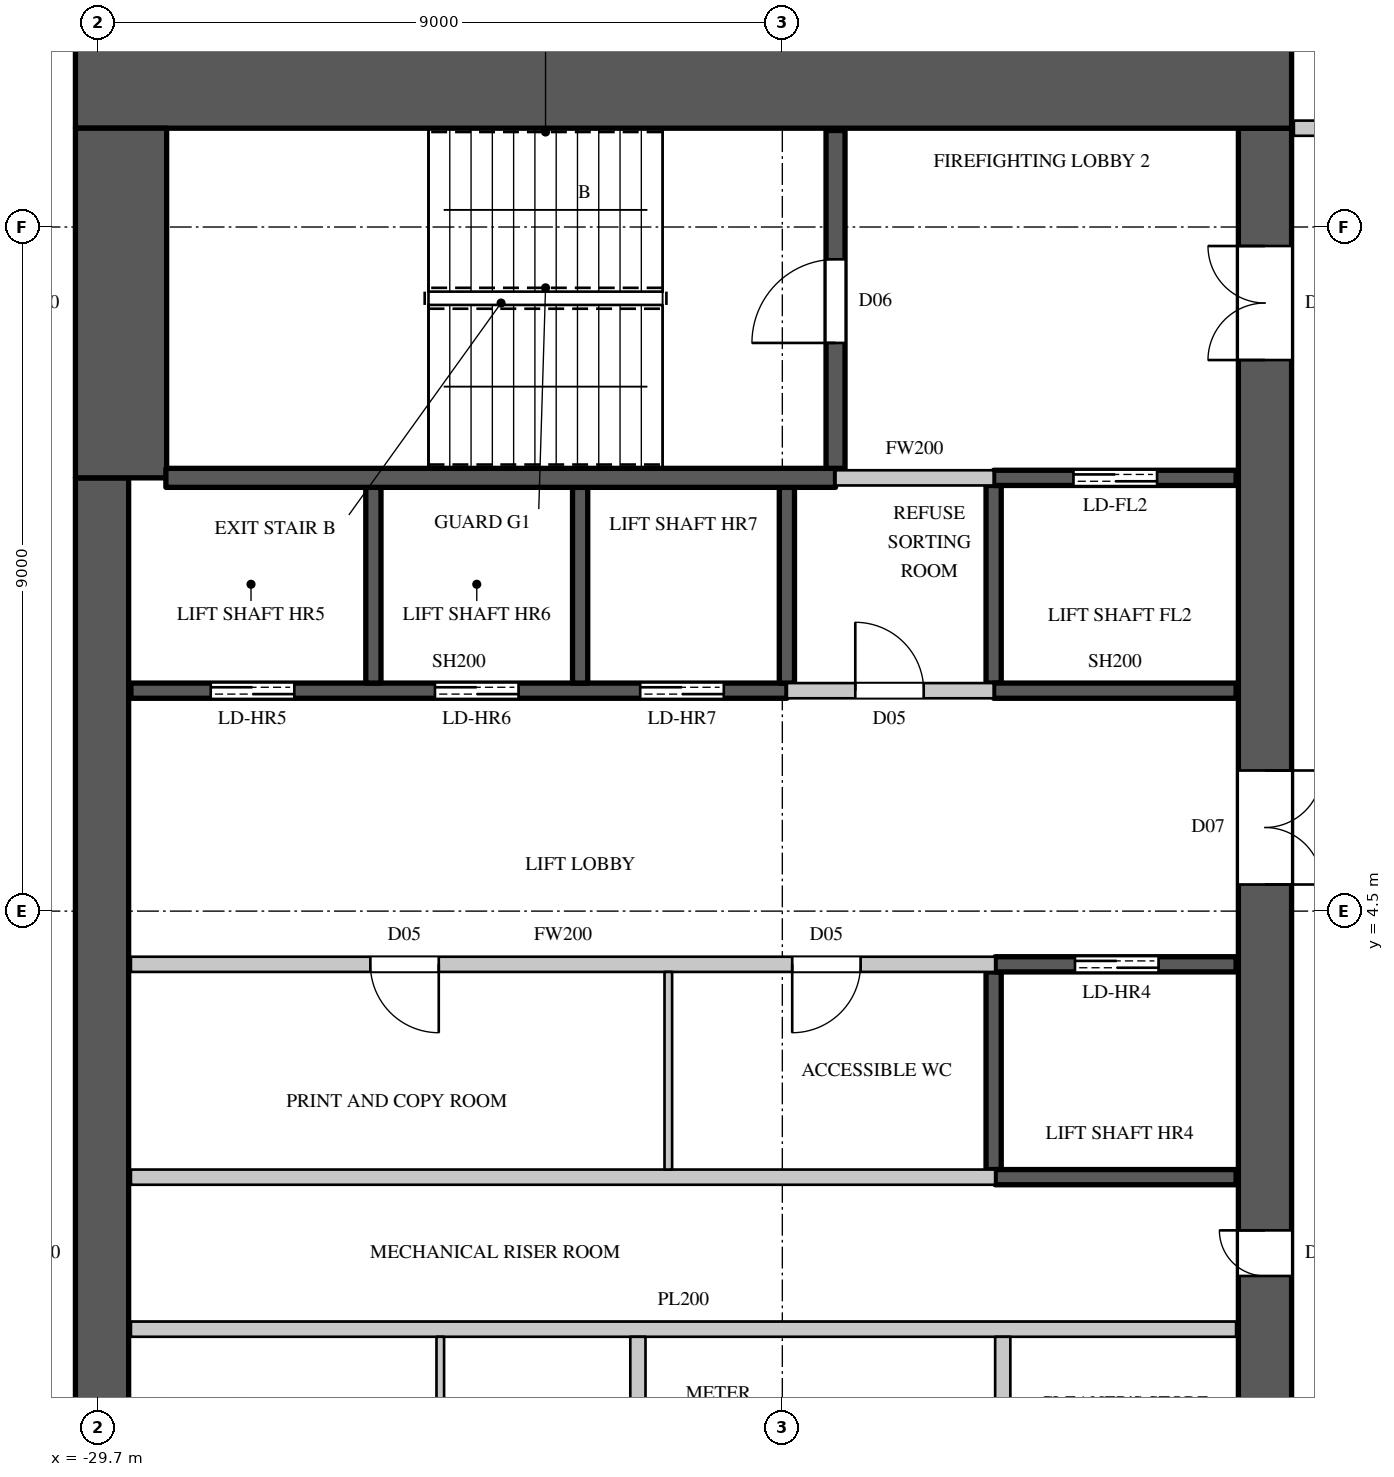
"""IFC4 building model, lengths in metres.
Left out: names, types, materials, properties, quantities, classifications, styles, units other than length and angle.
Written with IfcOpenShell. Run it as: python <this file> out.ifc"""

import sys

from ifc_helpers import new_model, si_unit, direction, frame, frame_2d, origin, place, context, subcontext, project, spatial, rectangle, extrude, element, fill, save


model = new_model("IFC4")
c1 = context("Model", 3, precision=1e-05, world=origin(), true_north=direction((0.0, 1.0)))
c2 = subcontext(c1, "Body", "Model", "MODEL_VIEW")
j1 = project(units=[si_unit("LENGTHUNIT", "METRE"), si_unit("PLANEANGLEUNIT", "RADIAN")], contexts=[c1])
p1 = place(None, origin())
s1 = spatial("IfcSite", under=j1, at=p1, CompositionType="ELEMENT")
p2 = place(p1, origin())
s2 = spatial("IfcBuilding", under=s1, at=p2, CompositionType="ELEMENT")
p3 = place(p2, frame((0.0, 0.0, 317.2)))
s3 = spatial("IfcBuildingStorey", under=s2, at=p3, CompositionType="ELEMENT", Elevation=317.2)
p4 = place(p3, frame((-30.0, 15.4, 0.0), z_axis=(0.0, 0.0, 1.0), x_axis=(1.0, 0.0, 0.0)))
e1 = element("IfcWall", 1, at=p4, inside=s3, PredefinedType="SHEAR", context=c2, shape_type="SweptSolid", body=[
    extrude(rectangle(XDim=16.0, YDim=1.2, at=frame_2d((8.0, 0.0))), origin(), (0.0, 0.0, 1.0), 4.1),
])
p5 = place(p3, frame((-14.35, -14.8, 0.0), z_axis=(0.0, 0.0, 1.0), x_axis=(0.0, 1.0, 0.0)))
e2 = element("IfcWall", 2, at=p5, inside=s3, PredefinedType="SHEAR", context=c2, shape_type="SweptSolid", body=[
    extrude(rectangle(XDim=29.6, YDim=0.7, at=frame_2d((14.8, 0.0))), origin(), (0.0, 0.0, 1.0), 4.1),
])
p6 = place(p5, frame((1.55, 0.0, 0.0)))
e3 = element("IfcOpeningElement", 3, at=p6, cuts=e2, PredefinedType="OPENING", context=c2, shape_type="SweptSolid", body=[
    extrude(rectangle(XDim=1.5, YDim=2.4, at=frame_2d((0.75, 1.2))), frame((0.0, 0.36, 0.0), z_axis=(0.0, -1.0, 0.0), x_axis=(1.0, 0.0, 0.0)), (0.0, 0.0, 1.0), 0.72),
])
p7 = place(p5, frame((26.55, 0.0, 0.0)))
e4 = element("IfcOpeningElement", 4, at=p7, cuts=e2, PredefinedType="OPENING", context=c2, shape_type="SweptSolid", body=[
    extrude(rectangle(XDim=1.5, YDim=2.4, at=frame_2d((0.75, 1.2))), frame((0.0, 0.36, 0.0), z_axis=(0.0, -1.0, 0.0), x_axis=(1.0, 0.0, 0.0)), (0.0, 0.0, 1.0), 0.72),
])
p8 = place(p5, frame((8.45, 0.0, 0.0)))
e5 = element("IfcOpeningElement", 5, at=p8, cuts=e2, PredefinedType="OPENING", context=c2, shape_type="SweptSolid", body=[
    extrude(rectangle(XDim=1.5, YDim=2.4, at=frame_2d((0.75, 1.2))), frame((0.0, 0.36, 0.0), z_axis=(0.0, -1.0, 0.0), x_axis=(1.0, 0.0, 0.0)), (0.0, 0.0, 1.0), 0.72),
])
p9 = place(p5, frame((19.65, 0.0, 0.0)))
e6 = element("IfcOpeningElement", 6, at=p9, cuts=e2, PredefinedType="OPENING", context=c2, shape_type="SweptSolid", body=[
    extrude(rectangle(XDim=1.5, YDim=2.4, at=frame_2d((0.75, 1.2))), frame((0.0, 0.36, 0.0), z_axis=(0.0, -1.0, 0.0), x_axis=(1.0, 0.0, 0.0)), (0.0, 0.0, 1.0), 0.72),
])
p10 = place(p5, frame((14.5, 0.0, 0.0)))
e7 = element("IfcOpeningElement", 7, at=p10, cuts=e2, PredefinedType="OPENING", context=c2, shape_type="SweptSolid", body=[
    extrude(rectangle(XDim=0.6, YDim=2.0, at=frame_2d((0.3, 1.0))), frame((0.0, 0.36, 0.0), z_axis=(0.0, -1.0, 0.0), x_axis=(1.0, 0.0, 0.0)), (0.0, 0.0, 1.0), 0.72),
])
p11 = place(p3, frame((-29.65, -10.2, 0.0), z_axis=(0.0, 0.0, 1.0), x_axis=(0.0, 1.0, 0.0)))
e8 = element("IfcWall", 8, at=p11, inside=s3, PredefinedType="SHEAR", context=c2, shape_type="SweptSolid", body=[
    extrude(rectangle(XDim=20.4, YDim=0.7, at=frame_2d((10.2, 0.0))), origin(), (0.0, 0.0, 1.0), 4.1),
])
p12 = place(p3, frame((-29.4, 10.2, 0.0), z_axis=(0.0, 0.0, 1.0), x_axis=(0.0, 1.0, 0.0)))
e9 = element("IfcWall", 9, at=p12, inside=s3, PredefinedType="SHEAR", context=c2, shape_type="SweptSolid", body=[
    extrude(rectangle(XDim=4.6, YDim=1.2, at=frame_2d((2.3, 0.0))), origin(), (0.0, 0.0, 1.0), 4.1),
])
p13 = place(p3, frame((-29.27, 3.8, 0.0), z_axis=(0.0, 0.0, 1.0), x_axis=(1.0, 0.0, 0.0)))
e10 = element("IfcWall", 10, at=p13, inside=s3, PredefinedType="PARTITIONING", context=c2, shape_type="SweptSolid", body=[
    extrude(rectangle(XDim=11.37, YDim=0.2, at=frame_2d((5.685, 0.0))), origin(), (0.0, 0.0, 1.0), 3.8),
])
p14 = place(p13, frame((3.15, 0.0, 0.0)))
e11 = element("IfcOpeningElement", 11, at=p14, cuts=e10, PredefinedType="OPENING", context=c2, shape_type="SweptSolid", body=[
    extrude(rectangle(XDim=0.9, YDim=2.2, at=frame_2d((0.45, 1.1))), frame((0.0, 0.11, 0.0), z_axis=(0.0, -1.0, 0.0), x_axis=(1.0, 0.0, 0.0)), (0.0, 0.0, 1.0), 0.22),
])
p15 = place(p13, frame((8.7, 0.0, 0.0)))
e12 = element("IfcOpeningElement", 12, at=p15, cuts=e10, PredefinedType="OPENING", context=c2, shape_type="SweptSolid", body=[
    extrude(rectangle(XDim=0.9, YDim=2.2, at=frame_2d((0.45, 1.1))), frame((0.0, 0.11, 0.0), z_axis=(0.0, -1.0, 0.0), x_axis=(1.0, 0.0, 0.0)), (0.0, 0.0, 1.0), 0.22),
])
p16 = place(p3, frame((-20.64, 7.4, 0.0), z_axis=(0.0, 0.0, 1.0), x_axis=(1.0, 0.0, 0.0)))
e13 = element("IfcWall", 13, at=p16, inside=s3, PredefinedType="PARTITIONING", context=c2, shape_type="SweptSolid", body=[
    extrude(rectangle(XDim=2.72, YDim=0.2, at=frame_2d((1.36, 0.0))), origin(), (0.0, 0.0, 1.0), 3.8),
])
p17 = place(p16, frame((0.9, 0.0, 0.0)))
e14 = element("IfcOpeningElement", 14, at=p17, cuts=e13, PredefinedType="OPENING", context=c2, shape_type="SweptSolid", body=[
    extrude(rectangle(XDim=0.9, YDim=2.2, at=frame_2d((0.45, 1.1))), frame((0.0, 0.11, 0.0), z_axis=(0.0, -1.0, 0.0), x_axis=(1.0, 0.0, 0.0)), (0.0, 0.0, 1.0), 0.22),
])
p18 = place(p3, frame((-20.0, 10.2, 0.0), z_axis=(0.0, 0.0, 1.0), x_axis=(1.0, 0.0, 0.0)))
e15 = element("IfcWall", 15, at=p18, inside=s3, PredefinedType="PARTITIONING", context=c2, shape_type="SweptSolid", body=[
    extrude(rectangle(XDim=2.08, YDim=0.2, at=frame_2d((1.04, 0.0))), origin(), (0.0, 0.0, 1.0), 3.8),
])
p19 = place(p3, frame((-13.97, 14.8, 0.0), z_axis=(0.0, 0.0, 1.0), x_axis=(1.0, 0.0, 0.0)))
e16 = element("IfcWall", 16, at=p19, inside=s3, PredefinedType="PARTITIONING", context=c2, shape_type="SweptSolid", body=[
    extrude(rectangle(XDim=3.07, YDim=0.2, at=frame_2d((1.535, 0.0))), origin(), (0.0, 0.0, 1.0), 3.8),
])
p20 = place(p3, frame((-29.27, -1.0, 0.0), z_axis=(0.0, 0.0, 1.0), x_axis=(1.0, 0.0, 0.0)))
e17 = element("IfcWall", 17, at=p20, inside=s3, PredefinedType="PARTITIONING", context=c2, shape_type="SweptSolid", body=[
    extrude(rectangle(XDim=14.54, YDim=0.2, at=frame_2d((7.27, 0.0))), origin(), (0.0, 0.0, 1.0), 3.8),
])
p21 = place(p3, frame((-29.27, 1.0, 0.0), z_axis=(0.0, 0.0, 1.0), x_axis=(1.0, 0.0, 0.0)))
e18 = element("IfcWall", 18, at=p21, inside=s3, PredefinedType="PARTITIONING", context=c2, shape_type="SweptSolid", body=[
    extrude(rectangle(XDim=11.37, YDim=0.2, at=frame_2d((5.685, 0.0))), origin(), (0.0, 0.0, 1.0), 3.8),
])
for number, where, z_axis, x_axis in (
    (19, (-22.6, -3.7, 0.0), (0.0, 0.0, 1.0), (0.0, 1.0, 0.0)),
    (20, (-17.8, -3.7, 0.0), (0.0, 0.0, 1.0), (0.0, 1.0, 0.0)),
):
    element("IfcWall", number, at=place(p3, frame(where, z_axis=z_axis, x_axis=x_axis)), inside=s3, PredefinedType="PARTITIONING", context=c2, shape_type="SweptSolid", body=[
        extrude(rectangle(XDim=2.6, YDim=0.2, at=frame_2d((1.3, 0.0))), origin(), (0.0, 0.0, 1.0), 3.8),
    ])
p22 = place(p3, frame((-29.27, 7.4, 0.0), z_axis=(0.0, 0.0, 1.0), x_axis=(1.0, 0.0, 0.0)))
e21 = element("IfcWall", 21, at=p22, inside=s3, PredefinedType="SHEAR", context=c2, shape_type="SweptSolid", body=[
    extrude(rectangle(XDim=8.63, YDim=0.2, at=frame_2d((4.315, 0.0))), origin(), (0.0, 0.0, 1.0), 3.8),
])
p23 = place(p22, frame((1.05, 0.0, 0.0)))
e22 = element("IfcOpeningElement", 22, at=p23, cuts=e21, PredefinedType="OPENING", context=c2, shape_type="SweptSolid", body=[
    extrude(rectangle(XDim=1.1, YDim=2.2, at=frame_2d((0.55, 1.1))), frame((0.0, 0.11, 0.0), z_axis=(0.0, -1.0, 0.0), x_axis=(1.0, 0.0, 0.0)), (0.0, 0.0, 1.0), 0.22),
])
p24 = place(p22, frame((4.0, 0.0, 0.0)))
e23 = element("IfcOpeningElement", 23, at=p24, cuts=e21, PredefinedType="OPENING", context=c2, shape_type="SweptSolid", body=[
    extrude(rectangle(XDim=1.1, YDim=2.2, at=frame_2d((0.55, 1.1))), frame((0.0, 0.11, 0.0), z_axis=(0.0, -1.0, 0.0), x_axis=(1.0, 0.0, 0.0)), (0.0, 0.0, 1.0), 0.22),
])
p25 = place(p22, frame((6.7, 0.0, 0.0)))
e24 = element("IfcOpeningElement", 24, at=p25, cuts=e21, PredefinedType="OPENING", context=c2, shape_type="SweptSolid", body=[
    extrude(rectangle(XDim=1.1, YDim=2.2, at=frame_2d((0.55, 1.1))), frame((0.0, 0.11, 0.0), z_axis=(0.0, -1.0, 0.0), x_axis=(1.0, 0.0, 0.0)), (0.0, 0.0, 1.0), 0.22),
])
for number, where, z_axis, x_axis in (
    (25, (-26.08, 7.5, 0.0), (0.0, 0.0, 1.0), (0.0, 1.0, 0.0)),
    (26, (-23.36, 7.5, 0.0), (0.0, 0.0, 1.0), (0.0, 1.0, 0.0)),
):
    element("IfcWall", number, at=place(p3, frame(where, z_axis=z_axis, x_axis=x_axis)), inside=s3, PredefinedType="SHEAR", context=c2, shape_type="SweptSolid", body=[
        extrude(rectangle(XDim=2.575, YDim=0.2, at=frame_2d((1.288, 0.0))), origin(), (0.0, 0.0, 1.0), 4.1),
    ])
p26 = place(p3, frame((-20.64, 7.5, 0.0), z_axis=(0.0, 0.0, 1.0), x_axis=(0.0, 1.0, 0.0)))
e27 = element("IfcWall", 27, at=p26, inside=s3, PredefinedType="SHEAR", context=c2, shape_type="SweptSolid", body=[
    extrude(rectangle(XDim=2.575, YDim=0.2, at=frame_2d((1.288, 0.0))), origin(), (0.0, 0.0, 1.0), 3.8),
])
p27 = place(p3, frame((-17.92, 1.1, 0.0), z_axis=(0.0, 0.0, 1.0), x_axis=(0.0, 1.0, 0.0)))
e28 = element("IfcWall", 28, at=p27, inside=s3, PredefinedType="SHEAR", context=c2, shape_type="SweptSolid", body=[
    extrude(rectangle(XDim=2.6, YDim=0.2, at=frame_2d((1.3, 0.0))), origin(), (0.0, 0.0, 1.0), 3.8),
])
p28 = place(p3, frame((-17.9, 1.0, 0.0), z_axis=(0.0, 0.0, 1.0), x_axis=(1.0, 0.0, 0.0)))
e29 = element("IfcWall", 29, at=p28, inside=s3, PredefinedType="SHEAR", context=c2, shape_type="SweptSolid", body=[
    extrude(rectangle(XDim=3.17, YDim=0.2, at=frame_2d((1.585, 0.0))), origin(), (0.0, 0.0, 1.0), 3.8),
])
p29 = place(p3, frame((-17.9, 3.8, 0.0), z_axis=(0.0, 0.0, 1.0), x_axis=(1.0, 0.0, 0.0)))
e30 = element("IfcWall", 30, at=p29, inside=s3, PredefinedType="SHEAR", context=c2, shape_type="SweptSolid", body=[
    extrude(rectangle(XDim=3.17, YDim=0.2, at=frame_2d((1.585, 0.0))), origin(), (0.0, 0.0, 1.0), 3.8),
])
p30 = place(p29, frame((1.05, 0.0, 0.0)))
e31 = element("IfcOpeningElement", 31, at=p30, cuts=e30, PredefinedType="OPENING", context=c2, shape_type="SweptSolid", body=[
    extrude(rectangle(XDim=1.1, YDim=2.2, at=frame_2d((0.55, 1.1))), frame((0.0, 0.11, 0.0), z_axis=(0.0, -1.0, 0.0), x_axis=(1.0, 0.0, 0.0)), (0.0, 0.0, 1.0), 0.22),
])
p31 = place(p3, frame((-17.92, 7.5, 0.0), z_axis=(0.0, 0.0, 1.0), x_axis=(0.0, 1.0, 0.0)))
e32 = element("IfcWall", 32, at=p31, inside=s3, PredefinedType="SHEAR", context=c2, shape_type="SweptSolid", body=[
    extrude(rectangle(XDim=2.6, YDim=0.2, at=frame_2d((1.3, 0.0))), origin(), (0.0, 0.0, 1.0), 3.8),
])
p32 = place(p3, frame((-17.92, 7.4, 0.0), z_axis=(0.0, 0.0, 1.0), x_axis=(1.0, 0.0, 0.0)))
e33 = element("IfcWall", 33, at=p32, inside=s3, PredefinedType="SHEAR", context=c2, shape_type="SweptSolid", body=[
    extrude(rectangle(XDim=3.19, YDim=0.2, at=frame_2d((1.595, 0.0))), origin(), (0.0, 0.0, 1.0), 3.8),
])
p33 = place(p3, frame((-17.92, 10.2, 0.0), z_axis=(0.0, 0.0, 1.0), x_axis=(1.0, 0.0, 0.0)))
e34 = element("IfcWall", 34, at=p33, inside=s3, PredefinedType="SHEAR", context=c2, shape_type="SweptSolid", body=[
    extrude(rectangle(XDim=3.19, YDim=0.2, at=frame_2d((1.595, 0.0))), origin(), (0.0, 0.0, 1.0), 3.8),
])
p34 = place(p33, frame((1.05, 0.0, 0.0)))
e35 = element("IfcOpeningElement", 35, at=p34, cuts=e34, PredefinedType="OPENING", context=c2, shape_type="SweptSolid", body=[
    extrude(rectangle(XDim=1.1, YDim=2.2, at=frame_2d((0.55, 1.1))), frame((0.0, 0.11, 0.0), z_axis=(0.0, -1.0, 0.0), x_axis=(1.0, 0.0, 0.0)), (0.0, 0.0, 1.0), 0.22),
])
p35 = place(p3, frame((-28.81, 10.2, 0.0), z_axis=(0.0, 0.0, 1.0), x_axis=(1.0, 0.0, 0.0)))
e36 = element("IfcWall", 36, at=p35, inside=s3, PredefinedType="SHEAR", context=c2, shape_type="SweptSolid", body=[
    extrude(rectangle(XDim=8.81, YDim=0.25, at=frame_2d((4.405, 0.0))), origin(), (0.0, 0.0, 1.0), 3.8),
])
p36 = place(p3, frame((-20.0, 10.325, 0.0), z_axis=(0.0, 0.0, 1.0), x_axis=(0.0, 1.0, 0.0)))
e37 = element("IfcWall", 37, at=p36, inside=s3, PredefinedType="SHEAR", context=c2, shape_type="SweptSolid", body=[
    extrude(rectangle(XDim=4.445, YDim=0.25, at=frame_2d((2.223, 0.0))), origin(), (0.0, 0.0, 1.0), 3.8),
])
p37 = place(p36, frame((1.65, 0.0, 0.0)))
e38 = element("IfcOpeningElement", 38, at=p37, cuts=e37, PredefinedType="OPENING", context=c2, shape_type="SweptSolid", body=[
    extrude(rectangle(XDim=1.1, YDim=2.2, at=frame_2d((0.55, 1.1))), frame((0.0, 0.135, 0.0), z_axis=(0.0, -1.0, 0.0), x_axis=(1.0, 0.0, 0.0)), (0.0, 0.0, 1.0), 0.27),
])
for number, where, z_axis, x_axis in (
    (39, (-25.2, -3.7, 0.0), (0.0, 0.0, 1.0), (0.0, 1.0, 0.0)),
    (40, (-22.2, 1.1, 0.0), (0.0, 0.0, 1.0), (0.0, 1.0, 0.0)),
):
    element("IfcWall", number, at=place(p3, frame(where, z_axis=z_axis, x_axis=x_axis)), inside=s3, PredefinedType="PARTITIONING", context=c2, shape_type="SweptSolid", body=[
        extrude(rectangle(XDim=2.6, YDim=0.1, at=frame_2d((1.3, 0.0))), origin(), (0.0, 0.0, 1.0), 3.8),
    ])
p38 = place(p37, origin())
e41 = element("IfcDoor", 41, at=p38, inside=s3, OperationType="SINGLE_SWING_LEFT", PredefinedType="DOOR", context=c2, shape_type="SweptSolid", body=[
    extrude(rectangle(XDim=1.1, YDim=2.2, at=frame_2d((0.55, 1.1))), frame((0.0, 0.025, 0.0), z_axis=(0.0, -1.0, 0.0), x_axis=(1.0, 0.0, 0.0)), (0.0, 0.0, 1.0), 0.05),
])
fill(e38, e41)
p39 = place(p14, origin())
e42 = element("IfcDoor", 42, at=p39, inside=s3, OperationType="SINGLE_SWING_LEFT", PredefinedType="DOOR", context=c2, shape_type="SweptSolid", body=[
    extrude(rectangle(XDim=0.9, YDim=2.2, at=frame_2d((0.45, 1.1))), frame((0.0, 0.025, 0.0), z_axis=(0.0, -1.0, 0.0), x_axis=(1.0, 0.0, 0.0)), (0.0, 0.0, 1.0), 0.05),
])
fill(e11, e42)
p40 = place(p15, origin())
e43 = element("IfcDoor", 43, at=p40, inside=s3, OperationType="SINGLE_SWING_RIGHT", PredefinedType="DOOR", context=c2, shape_type="SweptSolid", body=[
    extrude(rectangle(XDim=0.9, YDim=2.2, at=frame_2d((0.45, 1.1))), frame((0.0, 0.025, 0.0), z_axis=(0.0, -1.0, 0.0), x_axis=(1.0, 0.0, 0.0)), (0.0, 0.0, 1.0), 0.05),
])
fill(e12, e43)
p41 = place(p17, origin())
e44 = element("IfcDoor", 44, at=p41, inside=s3, OperationType="SINGLE_SWING_LEFT", PredefinedType="DOOR", context=c2, shape_type="SweptSolid", body=[
    extrude(rectangle(XDim=0.9, YDim=2.2, at=frame_2d((0.45, 1.1))), frame((0.0, 0.025, 0.0), z_axis=(0.0, -1.0, 0.0), x_axis=(1.0, 0.0, 0.0)), (0.0, 0.0, 1.0), 0.05),
])
fill(e14, e44)
p42 = place(p30, origin())
e45 = element("IfcDoor", 45, at=p42, inside=s3, OperationType="DOUBLE_DOOR_SLIDING", PredefinedType="DOOR", context=c2, shape_type="SweptSolid", body=[
    extrude(rectangle(XDim=1.1, YDim=2.2, at=frame_2d((0.55, 1.1))), frame((0.0, 0.025, 0.0), z_axis=(0.0, -1.0, 0.0), x_axis=(1.0, 0.0, 0.0)), (0.0, 0.0, 1.0), 0.05),
])
fill(e31, e45)
p43 = place(p23, origin())
e46 = element("IfcDoor", 46, at=p43, inside=s3, OperationType="DOUBLE_DOOR_SLIDING", PredefinedType="DOOR", context=c2, shape_type="SweptSolid", body=[
    extrude(rectangle(XDim=1.1, YDim=2.2, at=frame_2d((0.55, 1.1))), frame((0.0, 0.025, 0.0), z_axis=(0.0, -1.0, 0.0), x_axis=(1.0, 0.0, 0.0)), (0.0, 0.0, 1.0), 0.05),
])
fill(e22, e46)
p44 = place(p24, origin())
e47 = element("IfcDoor", 47, at=p44, inside=s3, OperationType="DOUBLE_DOOR_SLIDING", PredefinedType="DOOR", context=c2, shape_type="SweptSolid", body=[
    extrude(rectangle(XDim=1.1, YDim=2.2, at=frame_2d((0.55, 1.1))), frame((0.0, 0.025, 0.0), z_axis=(0.0, -1.0, 0.0), x_axis=(1.0, 0.0, 0.0)), (0.0, 0.0, 1.0), 0.05),
])
fill(e23, e47)
p45 = place(p25, origin())
e48 = element("IfcDoor", 48, at=p45, inside=s3, OperationType="DOUBLE_DOOR_SLIDING", PredefinedType="DOOR", context=c2, shape_type="SweptSolid", body=[
    extrude(rectangle(XDim=1.1, YDim=2.2, at=frame_2d((0.55, 1.1))), frame((0.0, 0.025, 0.0), z_axis=(0.0, -1.0, 0.0), x_axis=(1.0, 0.0, 0.0)), (0.0, 0.0, 1.0), 0.05),
])
fill(e24, e48)
p46 = place(p34, origin())
e49 = element("IfcDoor", 49, at=p46, inside=s3, OperationType="DOUBLE_DOOR_SLIDING", PredefinedType="DOOR", context=c2, shape_type="SweptSolid", body=[
    extrude(rectangle(XDim=1.1, YDim=2.2, at=frame_2d((0.55, 1.1))), frame((0.0, 0.025, 0.0), z_axis=(0.0, -1.0, 0.0), x_axis=(1.0, 0.0, 0.0)), (0.0, 0.0, 1.0), 0.05),
])
fill(e35, e49)
p47 = place(p7, origin())
e50 = element("IfcDoor", 50, at=p47, inside=s3, OperationType="DOUBLE_DOOR_SINGLE_SWING", PredefinedType="DOOR", context=c2, shape_type="SweptSolid", body=[
    extrude(rectangle(XDim=1.5, YDim=2.4, at=frame_2d((0.75, 1.2))), frame((0.0, 0.345, 0.0), z_axis=(0.0, -1.0, 0.0), x_axis=(1.0, 0.0, 0.0)), (0.0, 0.0, 1.0), 0.05),
])
fill(e4, e50)
p48 = place(p9, origin())
e51 = element("IfcDoor", 51, at=p48, inside=s3, OperationType="DOUBLE_DOOR_SINGLE_SWING", PredefinedType="DOOR", context=c2, shape_type="SweptSolid", body=[
    extrude(rectangle(XDim=1.5, YDim=2.4, at=frame_2d((0.75, 1.2))), frame((0.0, -0.295, 0.0), z_axis=(0.0, -1.0, 0.0), x_axis=(1.0, 0.0, 0.0)), (0.0, 0.0, 1.0), 0.05),
])
fill(e6, e51)
p49 = place(p10, origin())
e52 = element("IfcDoor", 52, at=p49, inside=s3, OperationType="SINGLE_SWING_RIGHT", PredefinedType="DOOR", context=c2, shape_type="SweptSolid", body=[
    extrude(rectangle(XDim=0.6, YDim=2.0, at=frame_2d((0.3, 1.0))), frame((0.0, 0.345, 0.0), z_axis=(0.0, -1.0, 0.0), x_axis=(1.0, 0.0, 0.0)), (0.0, 0.0, 1.0), 0.05),
])
fill(e7, e52)
save(model, sys.argv[1])
